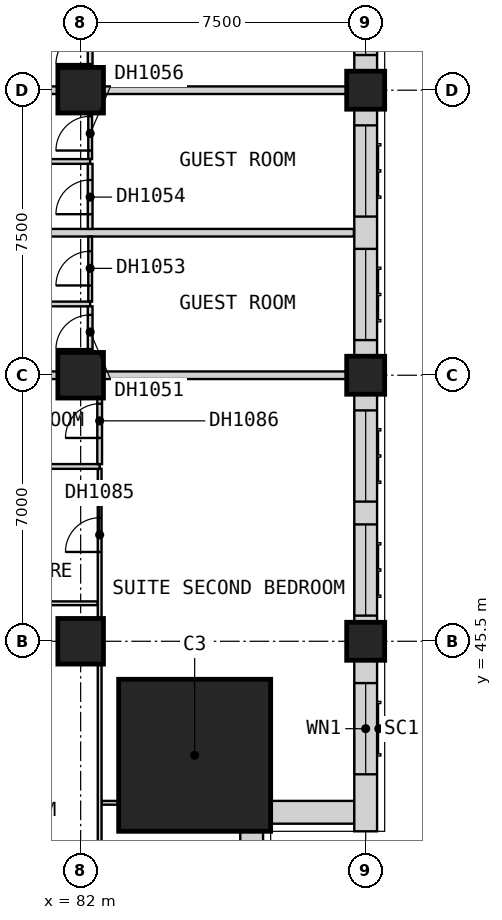
"""IFC4 building model, lengths in metres.
Left out: names, types, materials, properties, quantities, classifications, styles, units other than length and angle.
Written with IfcOpenShell. Run it as: python <this file> out.ifc"""

import sys

from ifc_helpers import new_model, si_unit, direction, frame, frame_2d, origin, origin_2d, place, context, subcontext, project, spatial, rectangle, extrude, element, fill, save


model = new_model("IFC4")
c1 = context("Model", 3, precision=1e-05, world=origin(), true_north=direction((0.0, 1.0)))
c2 = subcontext(c1, "Body", "Model", "MODEL_VIEW")
j1 = project(units=[si_unit("LENGTHUNIT", "METRE"), si_unit("PLANEANGLEUNIT", "RADIAN")], contexts=[c1])
p1 = place(None, origin())
s1 = spatial("IfcSite", under=j1, at=p1, CompositionType="ELEMENT")
p2 = place(p1, origin())
s2 = spatial("IfcBuilding", under=s1, at=p2, CompositionType="ELEMENT")
p3 = place(p2, frame((0.0, 0.0, 34.0)))
s3 = spatial("IfcBuildingStorey", under=s2, at=p3, CompositionType="ELEMENT", Elevation=34.0)
for number, where, z_axis, x_axis in (
    (1, (82.0, 45.5, 0.0), (0.0, 0.0, 1.0), (1.0, 0.0, 0.0)),
    (2, (82.0, 52.5, 0.0), (0.0, 0.0, 1.0), (1.0, 0.0, 0.0)),
    (3, (82.0, 60.0, 0.0), (0.0, 0.0, 1.0), (1.0, 0.0, 0.0)),
):
    element("IfcColumn", number, at=place(p3, frame(where, z_axis=z_axis, x_axis=x_axis)), inside=s3, PredefinedType="COLUMN", context=c2, shape_type="SweptSolid", body=[
        extrude(rectangle(XDim=1.2, YDim=1.2, at=origin_2d()), origin(), (0.0, 0.0, 1.0), 3.6),
    ])
for number, where, z_axis, x_axis in (
    (4, (89.5, 45.5, 0.0), (0.0, 0.0, 1.0), (1.0, 0.0, 0.0)),
    (5, (89.5, 52.5, 0.0), (0.0, 0.0, 1.0), (1.0, 0.0, 0.0)),
    (6, (89.5, 60.0, 0.0), (0.0, 0.0, 1.0), (1.0, 0.0, 0.0)),
):
    element("IfcColumn", number, at=place(p3, frame(where, z_axis=z_axis, x_axis=x_axis)), inside=s3, PredefinedType="COLUMN", context=c2, shape_type="SweptSolid", body=[
        extrude(rectangle(XDim=1.0, YDim=1.0, at=origin_2d()), origin(), (0.0, 0.0, 1.0), 3.6),
    ])
p4 = place(p3, frame((85.0, 42.5, 0.0), z_axis=(0.0, 0.0, 1.0), x_axis=(1.0, 0.0, 0.0)))
e7 = element("IfcColumn", 7, at=p4, inside=s3, PredefinedType="COLUMN", context=c2, shape_type="SweptSolid", body=[
    extrude(rectangle(XDim=4.0, YDim=4.0, at=origin_2d()), origin(), (0.0, 0.0, 1.0), 3.6),
])
for number, where, z_axis, x_axis in (
    (8, (86.5, 38.3, 0.0), (0.0, 0.0, 1.0), (0.0, 1.0, 0.0)),
    (9, (87.0, 41.0, 0.0), (0.0, 0.0, 1.0), (1.0, 0.0, 0.0)),
):
    element("IfcWall", number, at=place(p3, frame(where, z_axis=z_axis, x_axis=x_axis)), inside=s3, PredefinedType="SOLIDWALL", context=c2, shape_type="SweptSolid", body=[
        extrude(rectangle(XDim=2.2, YDim=0.6, at=frame_2d((1.1, 0.0))), origin(), (0.0, 0.0, 1.0), 3.35),
    ])
p5 = place(p3, frame((89.5, 40.5, 0.0), z_axis=(0.0, 0.0, 1.0), x_axis=(0.0, 1.0, 0.0)))
e10 = element("IfcWall", 10, at=p5, inside=s3, PredefinedType="SOLIDWALL", context=c2, shape_type="SweptSolid", body=[
    extrude(rectangle(XDim=4.5, YDim=0.6, at=frame_2d((2.25, 0.0))), origin(), (0.0, 0.0, 1.0), 3.35),
])
p6 = place(p5, frame((1.5, 0.0, 0.8)))
e11 = element("IfcOpeningElement", 11, at=p6, cuts=e10, PredefinedType="OPENING", context=c2, shape_type="SweptSolid", body=[
    extrude(rectangle(XDim=2.4, YDim=1.8, at=frame_2d((1.2, 0.9))), frame((0.0, 0.31, 0.0), z_axis=(0.0, -1.0, 0.0), x_axis=(1.0, 0.0, 0.0)), (0.0, 0.0, 1.0), 0.62),
])
p7 = place(p3, frame((89.5, 46.0, 0.0), z_axis=(0.0, 0.0, 1.0), x_axis=(0.0, 1.0, 0.0)))
e12 = element("IfcWall", 12, at=p7, inside=s3, PredefinedType="SOLIDWALL", context=c2, shape_type="SweptSolid", body=[
    extrude(rectangle(XDim=6.0, YDim=0.6, at=frame_2d((3.0, 0.0))), origin(), (0.0, 0.0, 1.0), 2.85),
])
p8 = place(p7, frame((0.175, 0.0, 0.8)))
e13 = element("IfcOpeningElement", 13, at=p8, cuts=e12, PredefinedType="OPENING", context=c2, shape_type="SweptSolid", body=[
    extrude(rectangle(XDim=2.4, YDim=1.8, at=frame_2d((1.2, 0.9))), frame((0.0, 0.31, 0.0), z_axis=(0.0, -1.0, 0.0), x_axis=(1.0, 0.0, 0.0)), (0.0, 0.0, 1.0), 0.62),
])
p9 = place(p7, frame((3.175, 0.0, 0.8)))
e14 = element("IfcOpeningElement", 14, at=p9, cuts=e12, PredefinedType="OPENING", context=c2, shape_type="SweptSolid", body=[
    extrude(rectangle(XDim=2.4, YDim=1.8, at=frame_2d((1.2, 0.9))), frame((0.0, 0.31, 0.0), z_axis=(0.0, -1.0, 0.0), x_axis=(1.0, 0.0, 0.0)), (0.0, 0.0, 1.0), 0.62),
])
p10 = place(p3, frame((89.5, 53.0, 0.0), z_axis=(0.0, 0.0, 1.0), x_axis=(0.0, 1.0, 0.0)))
e15 = element("IfcWall", 15, at=p10, inside=s3, PredefinedType="SOLIDWALL", context=c2, shape_type="SweptSolid", body=[
    extrude(rectangle(XDim=6.5, YDim=0.6, at=frame_2d((3.25, 0.0))), origin(), (0.0, 0.0, 1.0), 2.85),
])
p11 = place(p10, frame((0.425, 0.0, 0.8)))
e16 = element("IfcOpeningElement", 16, at=p11, cuts=e15, PredefinedType="OPENING", context=c2, shape_type="SweptSolid", body=[
    extrude(rectangle(XDim=2.4, YDim=1.8, at=frame_2d((1.2, 0.9))), frame((0.0, 0.31, 0.0), z_axis=(0.0, -1.0, 0.0), x_axis=(1.0, 0.0, 0.0)), (0.0, 0.0, 1.0), 0.62),
])
p12 = place(p10, frame((3.675, 0.0, 0.8)))
e17 = element("IfcOpeningElement", 17, at=p12, cuts=e15, PredefinedType="OPENING", context=c2, shape_type="SweptSolid", body=[
    extrude(rectangle(XDim=2.4, YDim=1.8, at=frame_2d((1.2, 0.9))), frame((0.0, 0.31, 0.0), z_axis=(0.0, -1.0, 0.0), x_axis=(1.0, 0.0, 0.0)), (0.0, 0.0, 1.0), 0.62),
])
p13 = place(p3, frame((89.5, 60.5, 0.0), z_axis=(0.0, 0.0, 1.0), x_axis=(0.0, 1.0, 0.0)))
e18 = element("IfcWall", 18, at=p13, inside=s3, PredefinedType="SOLIDWALL", context=c2, shape_type="SweptSolid", body=[
    extrude(rectangle(XDim=6.5, YDim=0.6, at=frame_2d((3.25, 0.0))), origin(), (0.0, 0.0, 1.0), 2.85),
])
p14 = place(p13, frame((0.425, 0.0, 0.8)))
e19 = element("IfcOpeningElement", 19, at=p14, cuts=e18, PredefinedType="OPENING", context=c2, shape_type="SweptSolid", body=[
    extrude(rectangle(XDim=2.4, YDim=1.8, at=frame_2d((1.2, 0.9))), frame((0.0, 0.31, 0.0), z_axis=(0.0, -1.0, 0.0), x_axis=(1.0, 0.0, 0.0)), (0.0, 0.0, 1.0), 0.62),
])
p15 = place(p13, frame((3.675, 0.0, 0.8)))
e20 = element("IfcOpeningElement", 20, at=p15, cuts=e18, PredefinedType="OPENING", context=c2, shape_type="SweptSolid", body=[
    extrude(rectangle(XDim=2.4, YDim=1.8, at=frame_2d((1.2, 0.9))), frame((0.0, 0.31, 0.0), z_axis=(0.0, -1.0, 0.0), x_axis=(1.0, 0.0, 0.0)), (0.0, 0.0, 1.0), 0.62),
])
p16 = place(p3, frame((77.475, 52.5, 0.0), z_axis=(0.0, 0.0, 1.0), x_axis=(1.0, 0.0, 0.0)))
e21 = element("IfcWall", 21, at=p16, inside=s3, PredefinedType="PARTITIONING", context=c2, shape_type="SweptSolid", body=[
    extrude(rectangle(XDim=12.525, YDim=0.2, at=frame_2d((6.262, 0.0))), origin(), (0.0, 0.0, 1.0), 3.35),
])
p17 = place(p3, frame((77.475, 56.25, 0.0), z_axis=(0.0, 0.0, 1.0), x_axis=(1.0, 0.0, 0.0)))
e22 = element("IfcWall", 22, at=p17, inside=s3, PredefinedType="PARTITIONING", context=c2, shape_type="SweptSolid", body=[
    extrude(rectangle(XDim=11.715, YDim=0.2, at=frame_2d((5.857, 0.0))), origin(), (0.0, 0.0, 1.0), 3.35),
])
p18 = place(p3, frame((77.475, 60.0, 0.0), z_axis=(0.0, 0.0, 1.0), x_axis=(1.0, 0.0, 0.0)))
e23 = element("IfcWall", 23, at=p18, inside=s3, PredefinedType="PARTITIONING", context=c2, shape_type="SweptSolid", body=[
    extrude(rectangle(XDim=12.525, YDim=0.2, at=frame_2d((6.262, 0.0))), origin(), (0.0, 0.0, 1.0), 3.35),
])
p19 = place(p3, frame((82.55, 41.25, 0.0), z_axis=(0.0, 0.0, 1.0), x_axis=(1.0, 0.0, 0.0)))
e24 = element("IfcWall", 24, at=p19, inside=s3, PredefinedType="PARTITIONING", context=c2, shape_type="SweptSolid", body=[
    extrude(rectangle(XDim=4.44, YDim=0.1, at=frame_2d((2.22, 0.0))), origin(), (0.0, 0.0, 1.0), 3.35),
])
p20 = place(p3, frame((75.1, 46.5, 0.0), z_axis=(0.0, 0.0, 1.0), x_axis=(1.0, 0.0, 0.0)))
e25 = element("IfcWall", 25, at=p20, inside=s3, PredefinedType="PARTITIONING", context=c2, shape_type="SweptSolid", body=[
    extrude(rectangle(XDim=7.35, YDim=0.1, at=frame_2d((3.675, 0.0))), origin(), (0.0, 0.0, 1.0), 3.35),
])
p21 = place(p20, frame((0.65, 0.0, 0.0)))
e26 = element("IfcOpeningElement", 26, at=p21, cuts=e25, PredefinedType="OPENING", context=c2, shape_type="SweptSolid", body=[
    extrude(rectangle(XDim=0.9, YDim=2.1, at=frame_2d((0.45, 1.05))), frame((0.0, 0.06, 0.0), z_axis=(0.0, -1.0, 0.0), x_axis=(1.0, 0.0, 0.0)), (0.0, 0.0, 1.0), 0.12),
])
p22 = place(p3, frame((82.25, 54.438, 0.0), z_axis=(0.0, 0.0, 1.0), x_axis=(0.0, 1.0, 0.0)))
e27 = element("IfcWall", 27, at=p22, inside=s3, PredefinedType="PARTITIONING", context=c2, shape_type="SweptSolid", body=[
    extrude(rectangle(XDim=1.712, YDim=0.1, at=frame_2d((0.856, 0.0))), origin(), (0.0, 0.0, 1.0), 3.35),
])
p23 = place(p22, frame((0.425, 0.0, 0.0)))
e28 = element("IfcOpeningElement", 28, at=p23, cuts=e27, PredefinedType="OPENING", context=c2, shape_type="SweptSolid", body=[
    extrude(rectangle(XDim=0.9, YDim=2.1, at=frame_2d((0.45, 1.05))), frame((0.0, 0.06, 0.0), z_axis=(0.0, -1.0, 0.0), x_axis=(1.0, 0.0, 0.0)), (0.0, 0.0, 1.0), 0.12),
])
p24 = place(p3, frame((82.25, 58.188, 0.0), z_axis=(0.0, 0.0, 1.0), x_axis=(0.0, 1.0, 0.0)))
e29 = element("IfcWall", 29, at=p24, inside=s3, PredefinedType="PARTITIONING", context=c2, shape_type="SweptSolid", body=[
    extrude(rectangle(XDim=1.712, YDim=0.1, at=frame_2d((0.856, 0.0))), origin(), (0.0, 0.0, 1.0), 3.35),
])
p25 = place(p24, frame((0.225, 0.0, 0.0)))
e30 = element("IfcOpeningElement", 30, at=p25, cuts=e29, PredefinedType="OPENING", context=c2, shape_type="SweptSolid", body=[
    extrude(rectangle(XDim=0.9, YDim=2.1, at=frame_2d((0.45, 1.05))), frame((0.0, 0.06, 0.0), z_axis=(0.0, -1.0, 0.0), x_axis=(1.0, 0.0, 0.0)), (0.0, 0.0, 1.0), 0.12),
])
p26 = place(p3, frame((82.5, 38.31, 0.0), z_axis=(0.0, 0.0, 1.0), x_axis=(0.0, 1.0, 0.0)))
e31 = element("IfcWall", 31, at=p26, inside=s3, PredefinedType="PARTITIONING", context=c2, shape_type="SweptSolid", body=[
    extrude(rectangle(XDim=11.728, YDim=0.1, at=frame_2d((5.864, 0.0))), origin(), (0.0, 0.0, 1.0), 3.35),
])
p27 = place(p26, frame((0.615, 0.0, 0.0)))
e32 = element("IfcOpeningElement", 32, at=p27, cuts=e31, PredefinedType="OPENING", context=c2, shape_type="SweptSolid", body=[
    extrude(rectangle(XDim=0.9, YDim=2.1, at=frame_2d((0.45, 1.05))), frame((0.0, 0.06, 0.0), z_axis=(0.0, -1.0, 0.0), x_axis=(1.0, 0.0, 0.0)), (0.0, 0.0, 1.0), 0.12),
])
p28 = place(p26, frame((9.54, 0.0, 0.0)))
e33 = element("IfcOpeningElement", 33, at=p28, cuts=e31, PredefinedType="OPENING", context=c2, shape_type="SweptSolid", body=[
    extrude(rectangle(XDim=0.9, YDim=2.1, at=frame_2d((0.45, 1.05))), frame((0.0, 0.06, 0.0), z_axis=(0.0, -1.0, 0.0), x_axis=(1.0, 0.0, 0.0)), (0.0, 0.0, 1.0), 0.12),
])
p29 = place(p3, frame((77.475, 50.1, 0.0), z_axis=(0.0, 0.0, 1.0), x_axis=(1.0, 0.0, 0.0)))
e34 = element("IfcWall", 34, at=p29, inside=s3, PredefinedType="PARTITIONING", context=c2, shape_type="SweptSolid", body=[
    extrude(rectangle(XDim=5.025, YDim=0.125, at=frame_2d((2.512, 0.0))), origin(), (0.0, 0.0, 1.0), 3.35),
])
for number, where, z_axis, x_axis in (
    (35, (77.475, 54.375, 0.0), (0.0, 0.0, 1.0), (1.0, 0.0, 0.0)),
    (36, (77.475, 58.125, 0.0), (0.0, 0.0, 1.0), (1.0, 0.0, 0.0)),
):
    element("IfcWall", number, at=place(p3, frame(where, z_axis=z_axis, x_axis=x_axis)), inside=s3, PredefinedType="PARTITIONING", context=c2, shape_type="SweptSolid", body=[
        extrude(rectangle(XDim=4.775, YDim=0.125, at=frame_2d((2.387, 0.0))), origin(), (0.0, 0.0, 1.0), 3.35),
    ])
p30 = place(p3, frame((82.25, 52.6, 0.0), z_axis=(0.0, 0.0, 1.0), x_axis=(0.0, 1.0, 0.0)))
e37 = element("IfcWall", 37, at=p30, inside=s3, PredefinedType="PARTITIONING", context=c2, shape_type="SweptSolid", body=[
    extrude(rectangle(XDim=1.712, YDim=0.125, at=frame_2d((0.856, 0.0))), origin(), (0.0, 0.0, 1.0), 3.35),
])
p31 = place(p30, frame((0.587, 0.0, 0.0)))
e38 = element("IfcOpeningElement", 38, at=p31, cuts=e37, PredefinedType="OPENING", context=c2, shape_type="SweptSolid", body=[
    extrude(rectangle(XDim=0.9, YDim=2.1, at=frame_2d((0.45, 1.05))), frame((0.0, 0.073, 0.0), z_axis=(0.0, -1.0, 0.0), x_axis=(1.0, 0.0, 0.0)), (0.0, 0.0, 1.0), 0.145),
])
p32 = place(p3, frame((82.25, 56.35, 0.0), z_axis=(0.0, 0.0, 1.0), x_axis=(0.0, 1.0, 0.0)))
e39 = element("IfcWall", 39, at=p32, inside=s3, PredefinedType="PARTITIONING", context=c2, shape_type="SweptSolid", body=[
    extrude(rectangle(XDim=1.712, YDim=0.125, at=frame_2d((0.856, 0.0))), origin(), (0.0, 0.0, 1.0), 3.35),
])
p33 = place(p32, frame((0.387, 0.0, 0.0)))
e40 = element("IfcOpeningElement", 40, at=p33, cuts=e39, PredefinedType="OPENING", context=c2, shape_type="SweptSolid", body=[
    extrude(rectangle(XDim=0.9, YDim=2.1, at=frame_2d((0.45, 1.05))), frame((0.0, 0.073, 0.0), z_axis=(0.0, -1.0, 0.0), x_axis=(1.0, 0.0, 0.0)), (0.0, 0.0, 1.0), 0.145),
])
p34 = place(p3, frame((82.25, 60.1, 0.0), z_axis=(0.0, 0.0, 1.0), x_axis=(0.0, 1.0, 0.0)))
e41 = element("IfcWall", 41, at=p34, inside=s3, PredefinedType="PARTITIONING", context=c2, shape_type="SweptSolid", body=[
    extrude(rectangle(XDim=1.712, YDim=0.125, at=frame_2d((0.856, 0.0))), origin(), (0.0, 0.0, 1.0), 3.35),
])
p35 = place(p34, frame((0.587, 0.0, 0.0)))
e42 = element("IfcOpeningElement", 42, at=p35, cuts=e41, PredefinedType="OPENING", context=c2, shape_type="SweptSolid", body=[
    extrude(rectangle(XDim=0.9, YDim=2.1, at=frame_2d((0.45, 1.05))), frame((0.0, 0.073, 0.0), z_axis=(0.0, -1.0, 0.0), x_axis=(1.0, 0.0, 0.0)), (0.0, 0.0, 1.0), 0.145),
])
p36 = place(p3, frame((82.5, 50.163, 0.0), z_axis=(0.0, 0.0, 1.0), x_axis=(0.0, 1.0, 0.0)))
e43 = element("IfcWall", 43, at=p36, inside=s3, PredefinedType="PARTITIONING", context=c2, shape_type="SweptSolid", body=[
    extrude(rectangle(XDim=2.237, YDim=0.125, at=frame_2d((1.119, 0.0))), origin(), (0.0, 0.0, 1.0), 3.35),
])
p37 = place(p36, frame((0.688, 0.0, 0.0)))
e44 = element("IfcOpeningElement", 44, at=p37, cuts=e43, PredefinedType="OPENING", context=c2, shape_type="SweptSolid", body=[
    extrude(rectangle(XDim=0.9, YDim=2.1, at=frame_2d((0.45, 1.05))), frame((0.0, 0.073, 0.0), z_axis=(0.0, -1.0, 0.0), x_axis=(1.0, 0.0, 0.0)), (0.0, 0.0, 1.0), 0.145),
])
p38 = place(p6, origin())
e45 = element("IfcWindow", 45, at=p38, inside=s3, PartitioningType="SINGLE_PANEL", PredefinedType="WINDOW", context=c2, shape_type="SweptSolid", body=[
    extrude(rectangle(XDim=2.4, YDim=1.8, at=frame_2d((1.2, 0.9))), frame((0.0, -0.07, 0.0), z_axis=(0.0, -1.0, 0.0), x_axis=(1.0, 0.0, 0.0)), (0.0, 0.0, 1.0), 0.06),
])
fill(e11, e45)
p39 = place(p8, origin())
e46 = element("IfcWindow", 46, at=p39, inside=s3, PartitioningType="SINGLE_PANEL", PredefinedType="WINDOW", context=c2, shape_type="SweptSolid", body=[
    extrude(rectangle(XDim=2.4, YDim=1.8, at=frame_2d((1.2, 0.9))), frame((0.0, -0.07, 0.0), z_axis=(0.0, -1.0, 0.0), x_axis=(1.0, 0.0, 0.0)), (0.0, 0.0, 1.0), 0.06),
])
fill(e13, e46)
p40 = place(p9, origin())
e47 = element("IfcWindow", 47, at=p40, inside=s3, PartitioningType="SINGLE_PANEL", PredefinedType="WINDOW", context=c2, shape_type="SweptSolid", body=[
    extrude(rectangle(XDim=2.4, YDim=1.8, at=frame_2d((1.2, 0.9))), frame((0.0, -0.07, 0.0), z_axis=(0.0, -1.0, 0.0), x_axis=(1.0, 0.0, 0.0)), (0.0, 0.0, 1.0), 0.06),
])
fill(e14, e47)
p41 = place(p11, origin())
e48 = element("IfcWindow", 48, at=p41, inside=s3, PartitioningType="SINGLE_PANEL", PredefinedType="WINDOW", context=c2, shape_type="SweptSolid", body=[
    extrude(rectangle(XDim=2.4, YDim=1.8, at=frame_2d((1.2, 0.9))), frame((0.0, -0.07, 0.0), z_axis=(0.0, -1.0, 0.0), x_axis=(1.0, 0.0, 0.0)), (0.0, 0.0, 1.0), 0.06),
])
fill(e16, e48)
p42 = place(p12, origin())
e49 = element("IfcWindow", 49, at=p42, inside=s3, PartitioningType="SINGLE_PANEL", PredefinedType="WINDOW", context=c2, shape_type="SweptSolid", body=[
    extrude(rectangle(XDim=2.4, YDim=1.8, at=frame_2d((1.2, 0.9))), frame((0.0, -0.07, 0.0), z_axis=(0.0, -1.0, 0.0), x_axis=(1.0, 0.0, 0.0)), (0.0, 0.0, 1.0), 0.06),
])
fill(e17, e49)
p43 = place(p14, origin())
e50 = element("IfcWindow", 50, at=p43, inside=s3, PartitioningType="SINGLE_PANEL", PredefinedType="WINDOW", context=c2, shape_type="SweptSolid", body=[
    extrude(rectangle(XDim=2.4, YDim=1.8, at=frame_2d((1.2, 0.9))), frame((0.0, -0.07, 0.0), z_axis=(0.0, -1.0, 0.0), x_axis=(1.0, 0.0, 0.0)), (0.0, 0.0, 1.0), 0.06),
])
fill(e19, e50)
p44 = place(p31, origin())
e51 = element("IfcDoor", 51, at=p44, inside=s3, OperationType="SINGLE_SWING_RIGHT", PredefinedType="DOOR", context=c2, shape_type="SweptSolid", body=[
    extrude(rectangle(XDim=0.9, YDim=2.1, at=frame_2d((0.45, 1.05))), frame((0.0, 0.025, 0.0), z_axis=(0.0, -1.0, 0.0), x_axis=(1.0, 0.0, 0.0)), (0.0, 0.0, 1.0), 0.05),
])
fill(e38, e51)
p45 = place(p23, origin())
e52 = element("IfcDoor", 52, at=p45, inside=s3, OperationType="SINGLE_SWING_LEFT", PredefinedType="DOOR", context=c2, shape_type="SweptSolid", body=[
    extrude(rectangle(XDim=0.9, YDim=2.1, at=frame_2d((0.45, 1.05))), frame((0.0, 0.025, 0.0), z_axis=(0.0, -1.0, 0.0), x_axis=(1.0, 0.0, 0.0)), (0.0, 0.0, 1.0), 0.05),
])
fill(e28, e52)
p46 = place(p33, origin())
e53 = element("IfcDoor", 53, at=p46, inside=s3, OperationType="SINGLE_SWING_LEFT", PredefinedType="DOOR", context=c2, shape_type="SweptSolid", body=[
    extrude(rectangle(XDim=0.9, YDim=2.1, at=frame_2d((0.45, 1.05))), frame((0.0, 0.025, 0.0), z_axis=(0.0, -1.0, 0.0), x_axis=(1.0, 0.0, 0.0)), (0.0, 0.0, 1.0), 0.05),
])
fill(e40, e53)
p47 = place(p25, origin())
e54 = element("IfcDoor", 54, at=p47, inside=s3, OperationType="SINGLE_SWING_LEFT", PredefinedType="DOOR", context=c2, shape_type="SweptSolid", body=[
    extrude(rectangle(XDim=0.9, YDim=2.1, at=frame_2d((0.45, 1.05))), frame((0.0, 0.025, 0.0), z_axis=(0.0, -1.0, 0.0), x_axis=(1.0, 0.0, 0.0)), (0.0, 0.0, 1.0), 0.05),
])
fill(e30, e54)
p48 = place(p35, origin())
e55 = element("IfcDoor", 55, at=p48, inside=s3, OperationType="SINGLE_SWING_RIGHT", PredefinedType="DOOR", context=c2, shape_type="SweptSolid", body=[
    extrude(rectangle(XDim=0.9, YDim=2.1, at=frame_2d((0.45, 1.05))), frame((0.0, 0.025, 0.0), z_axis=(0.0, -1.0, 0.0), x_axis=(1.0, 0.0, 0.0)), (0.0, 0.0, 1.0), 0.05),
])
fill(e42, e55)
p49 = place(p28, origin())
e56 = element("IfcDoor", 56, at=p49, inside=s3, OperationType="SINGLE_SWING_RIGHT", PredefinedType="DOOR", context=c2, shape_type="SweptSolid", body=[
    extrude(rectangle(XDim=0.9, YDim=2.1, at=frame_2d((0.45, 1.05))), frame((0.0, 0.025, 0.0), z_axis=(0.0, -1.0, 0.0), x_axis=(1.0, 0.0, 0.0)), (0.0, 0.0, 1.0), 0.05),
])
fill(e33, e56)
p50 = place(p37, origin())
e57 = element("IfcDoor", 57, at=p50, inside=s3, OperationType="SINGLE_SWING_LEFT", PredefinedType="DOOR", context=c2, shape_type="SweptSolid", body=[
    extrude(rectangle(XDim=0.9, YDim=2.1, at=frame_2d((0.45, 1.05))), frame((0.0, 0.025, 0.0), z_axis=(0.0, -1.0, 0.0), x_axis=(1.0, 0.0, 0.0)), (0.0, 0.0, 1.0), 0.05),
])
fill(e44, e57)
save(model, sys.argv[1])
